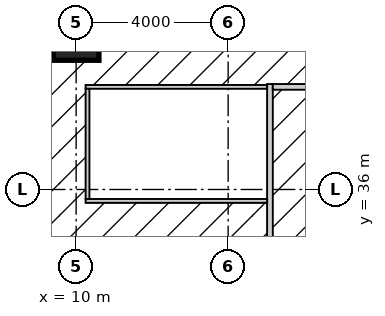
"""IFC4 building model, lengths in metres.
Left out: names, types, materials, properties, quantities, classifications, styles, units other than length and angle.
Written with IfcOpenShell. Run it as: python <this file> out.ifc"""

import sys

from ifc_helpers import new_model, si_unit, direction, frame, frame_2d, origin, origin_2d, place, context, subcontext, project, spatial, rectangle, hollow_rectangle, extrude, element, fill, save


model = new_model("IFC4")
c1 = context("Model", 3, precision=1e-05, world=origin(), true_north=direction((0.0, 1.0)))
c2 = subcontext(c1, "Body", "Model", "MODEL_VIEW")
j1 = project(units=[si_unit("LENGTHUNIT", "METRE"), si_unit("PLANEANGLEUNIT", "RADIAN")], contexts=[c1])
p1 = place(None, origin())
s1 = spatial("IfcSite", under=j1, at=p1, CompositionType="ELEMENT")
p2 = place(p1, origin())
s2 = spatial("IfcBuilding", under=s1, at=p2, CompositionType="ELEMENT")
p3 = place(p2, frame((0.0, 0.0, 51.0)))
s3 = spatial("IfcBuildingStorey", under=s2, at=p3, CompositionType="ELEMENT", Elevation=51.0)
p4 = place(p3, frame((10.0, 40.0, 0.0), z_axis=(0.0, 0.0, 1.0), x_axis=(1.0, 0.0, 0.0)))
e1 = element("IfcColumn", 1, at=p4, inside=s3, PredefinedType="COLUMN", context=c2, shape_type="SweptSolid", body=[
    extrude(hollow_rectangle(XDim=1.2, YDim=1.2, WallThickness=0.1, at=origin_2d()), origin(), (0.0, 0.0, 1.0), 4.0),
])
p5 = place(p3, frame((15.1, 15.225, 0.0), z_axis=(0.0, 0.0, 1.0), x_axis=(0.0, 1.0, 0.0)))
e2 = element("IfcWall", 2, at=p5, inside=s3, PredefinedType="PARTITIONING", context=c2, shape_type="SweptSolid", body=[
    extrude(rectangle(XDim=23.55, YDim=0.15, at=frame_2d((11.775, 0.0))), origin(), (0.0, 0.0, 1.0), 3.85),
])
p6 = place(p5, frame((10.875, 0.0, 0.0)))
e3 = element("IfcOpeningElement", 3, at=p6, cuts=e2, PredefinedType="OPENING", context=c2, shape_type="SweptSolid", body=[
    extrude(rectangle(XDim=1.8, YDim=2.4, at=frame_2d((0.9, 1.2))), frame((0.0, 0.085, 0.0), z_axis=(0.0, -1.0, 0.0), x_axis=(1.0, 0.0, 0.0)), (0.0, 0.0, 1.0), 0.17),
])
p7 = place(p3, frame((15.175, 38.7, 0.0), z_axis=(0.0, 0.0, 1.0), x_axis=(1.0, 0.0, 0.0)))
e4 = element("IfcWall", 4, at=p7, inside=s3, PredefinedType="PARTITIONING", context=c2, shape_type="SweptSolid", body=[
    extrude(rectangle(XDim=29.05, YDim=0.15, at=frame_2d((14.525, 0.0))), origin(), (0.0, 0.0, 1.0), 3.85),
])
p8 = place(p7, frame((8.575, 0.0, 0.0)))
e5 = element("IfcOpeningElement", 5, at=p8, cuts=e4, PredefinedType="OPENING", context=c2, shape_type="SweptSolid", body=[
    extrude(rectangle(XDim=0.9, YDim=2.1, at=frame_2d((0.45, 1.05))), frame((0.0, 0.085, 0.0), z_axis=(0.0, -1.0, 0.0), x_axis=(1.0, 0.0, 0.0)), (0.0, 0.0, 1.0), 0.17),
])
p9 = place(p7, frame((12.325, 0.0, 0.0)))
e6 = element("IfcOpeningElement", 6, at=p9, cuts=e4, PredefinedType="OPENING", context=c2, shape_type="SweptSolid", body=[
    extrude(rectangle(XDim=1.0, YDim=2.1, at=frame_2d((0.5, 1.05))), frame((0.0, 0.085, 0.0), z_axis=(0.0, -1.0, 0.0), x_axis=(1.0, 0.0, 0.0)), (0.0, 0.0, 1.0), 0.17),
])
p10 = place(p7, frame((16.175, 0.0, 0.0)))
e7 = element("IfcOpeningElement", 7, at=p10, cuts=e4, PredefinedType="OPENING", context=c2, shape_type="SweptSolid", body=[
    extrude(rectangle(XDim=0.9, YDim=2.1, at=frame_2d((0.45, 1.05))), frame((0.0, 0.085, 0.0), z_axis=(0.0, -1.0, 0.0), x_axis=(1.0, 0.0, 0.0)), (0.0, 0.0, 1.0), 0.17),
])
p11 = place(p3, frame((10.25, 35.7, 0.0), z_axis=(0.0, 0.0, 1.0), x_axis=(1.0, 0.0, 0.0)))
e8 = element("IfcWall", 8, at=p11, inside=s3, PredefinedType="PARTITIONING", context=c2, shape_type="SweptSolid", body=[
    extrude(rectangle(XDim=4.775, YDim=0.1, at=frame_2d((2.387, 0.0))), origin(), (0.0, 0.0, 1.0), 2.85),
])
p12 = place(p3, frame((10.25, 38.7, 0.0), z_axis=(0.0, 0.0, 1.0), x_axis=(1.0, 0.0, 0.0)))
e9 = element("IfcWall", 9, at=p12, inside=s3, PredefinedType="PARTITIONING", context=c2, shape_type="SweptSolid", body=[
    extrude(rectangle(XDim=4.775, YDim=0.1, at=frame_2d((2.387, 0.0))), origin(), (0.0, 0.0, 1.0), 3.85),
])
p13 = place(p3, frame((10.3, 35.75, 0.0), z_axis=(0.0, 0.0, 1.0), x_axis=(0.0, 1.0, 0.0)))
e10 = element("IfcWall", 10, at=p13, inside=s3, PredefinedType="PARTITIONING", context=c2, shape_type="SweptSolid", body=[
    extrude(rectangle(XDim=2.9, YDim=0.1, at=frame_2d((1.45, 0.0))), origin(), (0.0, 0.0, 1.0), 2.95),
])
p14 = place(p13, frame((0.95, 0.0, 0.0)))
e11 = element("IfcOpeningElement", 11, at=p14, cuts=e10, PredefinedType="OPENING", context=c2, shape_type="SweptSolid", body=[
    extrude(rectangle(XDim=1.0, YDim=2.2, at=frame_2d((0.5, 1.1))), frame((0.0, 0.06, 0.0), z_axis=(0.0, -1.0, 0.0), x_axis=(1.0, 0.0, 0.0)), (0.0, 0.0, 1.0), 0.12),
])
p15 = place(p14, origin())
e12 = element("IfcDoor", 12, at=p15, inside=s3, OperationType="SINGLE_SWING_LEFT", PredefinedType="DOOR", context=c2, shape_type="SweptSolid", body=[
    extrude(rectangle(XDim=1.0, YDim=2.2, at=frame_2d((0.5, 1.1))), frame((0.0, 0.025, 0.0), z_axis=(0.0, -1.0, 0.0), x_axis=(1.0, 0.0, 0.0)), (0.0, 0.0, 1.0), 0.05),
])
fill(e11, e12)
save(model, sys.argv[1])
